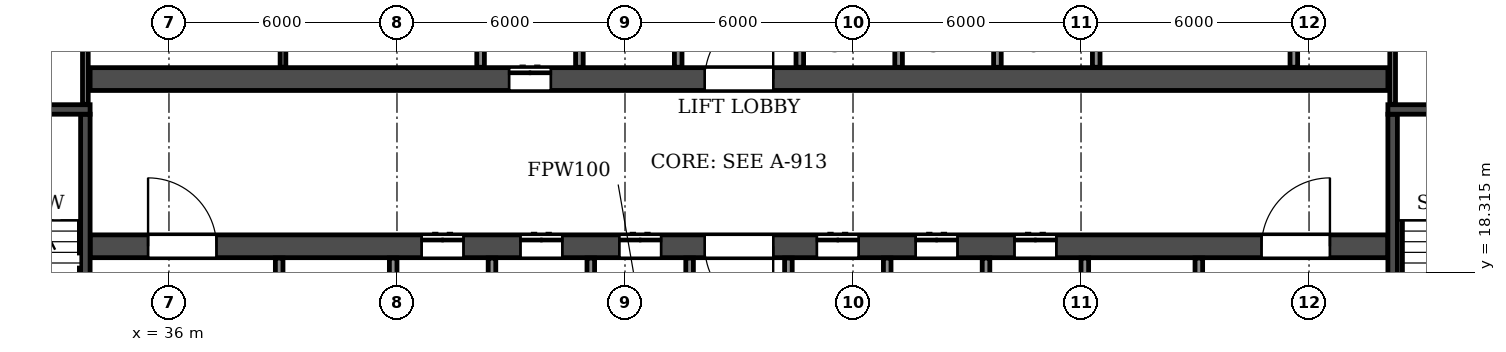
"""IFC4 building model, lengths in metres.
Left out: names, types, materials, properties, quantities, classifications, styles, units other than length and angle.
Written with IfcOpenShell. Run it as: python <this file> out.ifc"""

import sys

from ifc_helpers import new_model, si_unit, direction, frame, frame_2d, origin, place, context, subcontext, project, spatial, rectangle, extrude, element, fill, save


model = new_model("IFC4")
c1 = context("Model", 3, precision=1e-05, world=origin(), true_north=direction((0.0, 1.0)))
c2 = subcontext(c1, "Body", "Model", "MODEL_VIEW")
j1 = project(units=[si_unit("LENGTHUNIT", "METRE"), si_unit("PLANEANGLEUNIT", "RADIAN")], contexts=[c1])
p1 = place(None, origin())
s1 = spatial("IfcSite", under=j1, at=p1, CompositionType="ELEMENT")
p2 = place(p1, origin())
s2 = spatial("IfcBuilding", under=s1, at=p2, CompositionType="ELEMENT")
p3 = place(p2, frame((0.0, 0.0, 63.0)))
s3 = spatial("IfcBuildingStorey", under=s2, at=p3, CompositionType="ELEMENT", Elevation=63.0)
p4 = place(p3, frame((33.925, 19.0, 0.0), z_axis=(0.0, 0.0, 1.0), x_axis=(1.0, 0.0, 0.0)))
e1 = element("IfcWall", 1, at=p4, inside=s3, PredefinedType="SOLIDWALL", context=c2, shape_type="SweptSolid", body=[
    extrude(rectangle(XDim=34.15, YDim=0.6, at=frame_2d((17.075, 0.0))), origin(), (0.0, 0.0, 1.0), 2.95),
])
p5 = place(p4, frame((16.175, 0.0, 0.0)))
e2 = element("IfcOpeningElement", 2, at=p5, cuts=e1, PredefinedType="OPENING", context=c2, shape_type="SweptSolid", body=[
    extrude(rectangle(XDim=1.8, YDim=2.1, at=frame_2d((0.9, 1.05))), frame((0.0, 0.31, 0.0), z_axis=(0.0, -1.0, 0.0), x_axis=(1.0, 0.0, 0.0)), (0.0, 0.0, 1.0), 0.62),
])
p6 = place(p4, frame((1.525, 0.0, 0.0)))
e3 = element("IfcOpeningElement", 3, at=p6, cuts=e1, PredefinedType="OPENING", context=c2, shape_type="SweptSolid", body=[
    extrude(rectangle(XDim=1.8, YDim=2.1, at=frame_2d((0.9, 1.05))), frame((0.0, 0.31, 0.0), z_axis=(0.0, -1.0, 0.0), x_axis=(1.0, 0.0, 0.0)), (0.0, 0.0, 1.0), 0.62),
])
p7 = place(p4, frame((8.725, 0.0, 0.0)))
e4 = element("IfcOpeningElement", 4, at=p7, cuts=e1, PredefinedType="OPENING", context=c2, shape_type="SweptSolid", body=[
    extrude(rectangle(XDim=1.1, YDim=2.1, at=frame_2d((0.55, 1.05))), frame((0.0, 0.31, 0.0), z_axis=(0.0, -1.0, 0.0), x_axis=(1.0, 0.0, 0.0)), (0.0, 0.0, 1.0), 0.62),
])
p8 = place(p4, frame((11.325, 0.0, 0.0)))
e5 = element("IfcOpeningElement", 5, at=p8, cuts=e1, PredefinedType="OPENING", context=c2, shape_type="SweptSolid", body=[
    extrude(rectangle(XDim=1.1, YDim=2.1, at=frame_2d((0.55, 1.05))), frame((0.0, 0.31, 0.0), z_axis=(0.0, -1.0, 0.0), x_axis=(1.0, 0.0, 0.0)), (0.0, 0.0, 1.0), 0.62),
])
p9 = place(p4, frame((13.925, 0.0, 0.0)))
e6 = element("IfcOpeningElement", 6, at=p9, cuts=e1, PredefinedType="OPENING", context=c2, shape_type="SweptSolid", body=[
    extrude(rectangle(XDim=1.1, YDim=2.1, at=frame_2d((0.55, 1.05))), frame((0.0, 0.31, 0.0), z_axis=(0.0, -1.0, 0.0), x_axis=(1.0, 0.0, 0.0)), (0.0, 0.0, 1.0), 0.62),
])
p10 = place(p4, frame((19.125, 0.0, 0.0)))
e7 = element("IfcOpeningElement", 7, at=p10, cuts=e1, PredefinedType="OPENING", context=c2, shape_type="SweptSolid", body=[
    extrude(rectangle(XDim=1.1, YDim=2.1, at=frame_2d((0.55, 1.05))), frame((0.0, 0.31, 0.0), z_axis=(0.0, -1.0, 0.0), x_axis=(1.0, 0.0, 0.0)), (0.0, 0.0, 1.0), 0.62),
])
p11 = place(p4, frame((21.725, 0.0, 0.0)))
e8 = element("IfcOpeningElement", 8, at=p11, cuts=e1, PredefinedType="OPENING", context=c2, shape_type="SweptSolid", body=[
    extrude(rectangle(XDim=1.1, YDim=2.1, at=frame_2d((0.55, 1.05))), frame((0.0, 0.31, 0.0), z_axis=(0.0, -1.0, 0.0), x_axis=(1.0, 0.0, 0.0)), (0.0, 0.0, 1.0), 0.62),
])
p12 = place(p4, frame((24.325, 0.0, 0.0)))
e9 = element("IfcOpeningElement", 9, at=p12, cuts=e1, PredefinedType="OPENING", context=c2, shape_type="SweptSolid", body=[
    extrude(rectangle(XDim=1.1, YDim=2.1, at=frame_2d((0.55, 1.05))), frame((0.0, 0.31, 0.0), z_axis=(0.0, -1.0, 0.0), x_axis=(1.0, 0.0, 0.0)), (0.0, 0.0, 1.0), 0.62),
])
p13 = place(p4, frame((30.825, 0.0, 0.0)))
e10 = element("IfcOpeningElement", 10, at=p13, cuts=e1, PredefinedType="OPENING", context=c2, shape_type="SweptSolid", body=[
    extrude(rectangle(XDim=1.8, YDim=2.1, at=frame_2d((0.9, 1.05))), frame((0.0, 0.31, 0.0), z_axis=(0.0, -1.0, 0.0), x_axis=(1.0, 0.0, 0.0)), (0.0, 0.0, 1.0), 0.62),
])
p14 = place(p3, frame((33.925, 23.4, 0.0), z_axis=(0.0, 0.0, 1.0), x_axis=(1.0, 0.0, 0.0)))
e11 = element("IfcWall", 11, at=p14, inside=s3, PredefinedType="SOLIDWALL", context=c2, shape_type="SweptSolid", body=[
    extrude(rectangle(XDim=34.15, YDim=0.6, at=frame_2d((17.075, 0.0))), origin(), (0.0, 0.0, 1.0), 2.95),
])
p15 = place(p14, frame((16.175, 0.0, 0.0)))
e12 = element("IfcOpeningElement", 12, at=p15, cuts=e11, PredefinedType="OPENING", context=c2, shape_type="SweptSolid", body=[
    extrude(rectangle(XDim=1.8, YDim=2.1, at=frame_2d((0.9, 1.05))), frame((0.0, 0.31, 0.0), z_axis=(0.0, -1.0, 0.0), x_axis=(1.0, 0.0, 0.0)), (0.0, 0.0, 1.0), 0.62),
])
p16 = place(p14, frame((11.025, 0.0, 0.0)))
e13 = element("IfcOpeningElement", 13, at=p16, cuts=e11, PredefinedType="OPENING", context=c2, shape_type="SweptSolid", body=[
    extrude(rectangle(XDim=1.1, YDim=2.1, at=frame_2d((0.55, 1.05))), frame((0.0, 0.31, 0.0), z_axis=(0.0, -1.0, 0.0), x_axis=(1.0, 0.0, 0.0)), (0.0, 0.0, 1.0), 0.62),
])
p17 = place(p3, frame((33.8, 14.9, 0.0), z_axis=(0.0, 0.0, 1.0), x_axis=(0.0, 1.0, 0.0)))
e14 = element("IfcWall", 14, at=p17, inside=s3, PredefinedType="SOLIDWALL", context=c2, shape_type="SweptSolid", body=[
    extrude(rectangle(XDim=7.575, YDim=0.25, at=frame_2d((3.788, 0.0))), origin(), (0.0, 0.0, 1.0), 2.95),
])
p18 = place(p17, frame((0.4, 0.0, 0.0)))
e15 = element("IfcOpeningElement", 15, at=p18, cuts=e14, PredefinedType="OPENING", context=c2, shape_type="SweptSolid", body=[
    extrude(rectangle(XDim=1.0, YDim=2.1, at=frame_2d((0.5, 1.05))), frame((0.0, 0.135, 0.0), z_axis=(0.0, -1.0, 0.0), x_axis=(1.0, 0.0, 0.0)), (0.0, 0.0, 1.0), 0.27),
])
p19 = place(p3, frame((29.875, 22.6, 0.0), z_axis=(0.0, 0.0, 1.0), x_axis=(1.0, 0.0, 0.0)))
e16 = element("IfcWall", 16, at=p19, inside=s3, PredefinedType="SOLIDWALL", context=c2, shape_type="SweptSolid", body=[
    extrude(rectangle(XDim=4.05, YDim=0.25, at=frame_2d((2.025, 0.0))), origin(), (0.0, 0.0, 1.0), 2.95),
])
p20 = place(p3, frame((68.2, 14.9, 0.0), z_axis=(0.0, 0.0, 1.0), x_axis=(0.0, 1.0, 0.0)))
e17 = element("IfcWall", 17, at=p20, inside=s3, PredefinedType="SOLIDWALL", context=c2, shape_type="SweptSolid", body=[
    extrude(rectangle(XDim=7.575, YDim=0.25, at=frame_2d((3.788, 0.0))), origin(), (0.0, 0.0, 1.0), 2.95),
])
p21 = place(p20, frame((0.4, 0.0, 0.0)))
e18 = element("IfcOpeningElement", 18, at=p21, cuts=e17, PredefinedType="OPENING", context=c2, shape_type="SweptSolid", body=[
    extrude(rectangle(XDim=1.0, YDim=2.1, at=frame_2d((0.5, 1.05))), frame((0.0, 0.135, 0.0), z_axis=(0.0, -1.0, 0.0), x_axis=(1.0, 0.0, 0.0)), (0.0, 0.0, 1.0), 0.27),
])
p22 = place(p3, frame((68.075, 22.6, 0.0), z_axis=(0.0, 0.0, 1.0), x_axis=(1.0, 0.0, 0.0)))
e19 = element("IfcWall", 19, at=p22, inside=s3, PredefinedType="SOLIDWALL", context=c2, shape_type="SweptSolid", body=[
    extrude(rectangle(XDim=4.05, YDim=0.25, at=frame_2d((2.025, 0.0))), origin(), (0.0, 0.0, 1.0), 2.95),
])
p23 = place(p3, frame((39.0, 23.71, 0.0), z_axis=(0.0, 0.0, 1.0), x_axis=(0.0, 1.0, 0.0)))
e20 = element("IfcWall", 20, at=p23, inside=s3, PredefinedType="PARTITIONING", context=c2, shape_type="SweptSolid", body=[
    extrude(rectangle(XDim=3.78, YDim=0.15, at=frame_2d((1.89, 0.0))), origin(), (0.0, 0.0, 1.0), 2.95),
])
for number, where, z_axis, x_axis in (
    (21, (49.4, 23.71, 0.0), (0.0, 0.0, 1.0), (0.0, 1.0, 0.0)),
    (22, (65.6, 23.71, 0.0), (0.0, 0.0, 1.0), (0.0, 1.0, 0.0)),
):
    element("IfcWall", number, at=place(p3, frame(where, z_axis=z_axis, x_axis=x_axis)), inside=s3, PredefinedType="PARTITIONING", context=c2, shape_type="SweptSolid", body=[
        extrude(rectangle(XDim=3.78, YDim=0.2, at=frame_2d((1.89, 0.0))), origin(), (0.0, 0.0, 1.0), 2.95),
    ])
for number, where, z_axis, x_axis in (
    (23, (33.8, 22.735, 0.0), (0.0, 0.0, 1.0), (0.0, 1.0, 0.0)),
    (24, (68.2, 22.735, 0.0), (0.0, 0.0, 1.0), (0.0, 1.0, 0.0)),
):
    element("IfcWall", number, at=place(p3, frame(where, z_axis=z_axis, x_axis=x_axis)), inside=s3, PredefinedType="PARTITIONING", context=c2, shape_type="SweptSolid", body=[
        extrude(rectangle(XDim=4.755, YDim=0.15, at=frame_2d((2.377, 0.0))), origin(), (0.0, 0.0, 1.0), 2.95),
    ])
p24 = place(p3, frame((38.9, 14.91, 0.0), z_axis=(0.0, 0.0, 1.0), x_axis=(0.0, 1.0, 0.0)))
e25 = element("IfcWall", 25, at=p24, inside=s3, PredefinedType="PARTITIONING", context=c2, shape_type="SweptSolid", body=[
    extrude(rectangle(XDim=3.78, YDim=0.2, at=frame_2d((1.89, 0.0))), origin(), (0.0, 0.0, 1.0), 2.95),
])
p25 = place(p24, frame((1.34, 0.0, 0.0)))
e26 = element("IfcOpeningElement", 26, at=p25, cuts=e25, PredefinedType="OPENING", context=c2, shape_type="SweptSolid", body=[
    extrude(rectangle(XDim=1.1, YDim=2.1, at=frame_2d((0.55, 1.05))), frame((0.0, 0.11, 0.0), z_axis=(0.0, -1.0, 0.0), x_axis=(1.0, 0.0, 0.0)), (0.0, 0.0, 1.0), 0.22),
])
for number, where, z_axis, x_axis in (
    (27, (41.9, 14.91, 0.0), (0.0, 0.0, 1.0), (0.0, 1.0, 0.0)),
    (28, (44.2, 23.71, 0.0), (0.0, 0.0, 1.0), (0.0, 1.0, 0.0)),
):
    element("IfcWall", number, at=place(p3, frame(where, z_axis=z_axis, x_axis=x_axis)), inside=s3, PredefinedType="PARTITIONING", context=c2, shape_type="SweptSolid", body=[
        extrude(rectangle(XDim=3.78, YDim=0.2, at=frame_2d((1.89, 0.0))), origin(), (0.0, 0.0, 1.0), 2.95),
    ])
p26 = place(p3, frame((44.5, 16.3, 0.0), z_axis=(0.0, 0.0, 1.0), x_axis=(0.0, 1.0, 0.0)))
e29 = element("IfcWall", 29, at=p26, inside=s3, PredefinedType="PARTITIONING", context=c2, shape_type="SweptSolid", body=[
    extrude(rectangle(XDim=2.39, YDim=0.2, at=frame_2d((1.195, 0.0))), origin(), (0.0, 0.0, 1.0), 2.95),
])
p27 = place(p3, frame((46.8, 23.71, 0.0), z_axis=(0.0, 0.0, 1.0), x_axis=(0.0, 1.0, 0.0)))
e30 = element("IfcWall", 30, at=p27, inside=s3, PredefinedType="PARTITIONING", context=c2, shape_type="SweptSolid", body=[
    extrude(rectangle(XDim=3.78, YDim=0.2, at=frame_2d((1.89, 0.0))), origin(), (0.0, 0.0, 1.0), 2.95),
])
for number, where, z_axis, x_axis in (
    (31, (47.1, 16.3, 0.0), (0.0, 0.0, 1.0), (0.0, 1.0, 0.0)),
    (32, (49.7, 16.3, 0.0), (0.0, 0.0, 1.0), (0.0, 1.0, 0.0)),
    (33, (52.3, 16.3, 0.0), (0.0, 0.0, 1.0), (0.0, 1.0, 0.0)),
):
    element("IfcWall", number, at=place(p3, frame(where, z_axis=z_axis, x_axis=x_axis)), inside=s3, PredefinedType="PARTITIONING", context=c2, shape_type="SweptSolid", body=[
        extrude(rectangle(XDim=2.39, YDim=0.2, at=frame_2d((1.195, 0.0))), origin(), (0.0, 0.0, 1.0), 2.95),
    ])
p28 = place(p3, frame((52.6, 23.71, 0.0), z_axis=(0.0, 0.0, 1.0), x_axis=(0.0, 1.0, 0.0)))
e34 = element("IfcWall", 34, at=p28, inside=s3, PredefinedType="PARTITIONING", context=c2, shape_type="SweptSolid", body=[
    extrude(rectangle(XDim=2.39, YDim=0.2, at=frame_2d((1.195, 0.0))), origin(), (0.0, 0.0, 1.0), 2.95),
])
p29 = place(p3, frame((54.9, 16.3, 0.0), z_axis=(0.0, 0.0, 1.0), x_axis=(0.0, 1.0, 0.0)))
e35 = element("IfcWall", 35, at=p29, inside=s3, PredefinedType="PARTITIONING", context=c2, shape_type="SweptSolid", body=[
    extrude(rectangle(XDim=2.39, YDim=0.2, at=frame_2d((1.195, 0.0))), origin(), (0.0, 0.0, 1.0), 2.95),
])
p30 = place(p3, frame((55.2, 23.71, 0.0), z_axis=(0.0, 0.0, 1.0), x_axis=(0.0, 1.0, 0.0)))
e36 = element("IfcWall", 36, at=p30, inside=s3, PredefinedType="PARTITIONING", context=c2, shape_type="SweptSolid", body=[
    extrude(rectangle(XDim=2.39, YDim=0.2, at=frame_2d((1.195, 0.0))), origin(), (0.0, 0.0, 1.0), 2.95),
])
p31 = place(p3, frame((57.5, 16.3, 0.0), z_axis=(0.0, 0.0, 1.0), x_axis=(0.0, 1.0, 0.0)))
e37 = element("IfcWall", 37, at=p31, inside=s3, PredefinedType="PARTITIONING", context=c2, shape_type="SweptSolid", body=[
    extrude(rectangle(XDim=2.39, YDim=0.2, at=frame_2d((1.195, 0.0))), origin(), (0.0, 0.0, 1.0), 2.95),
])
p32 = place(p3, frame((57.8, 23.71, 0.0), z_axis=(0.0, 0.0, 1.0), x_axis=(0.0, 1.0, 0.0)))
e38 = element("IfcWall", 38, at=p32, inside=s3, PredefinedType="PARTITIONING", context=c2, shape_type="SweptSolid", body=[
    extrude(rectangle(XDim=2.39, YDim=0.2, at=frame_2d((1.195, 0.0))), origin(), (0.0, 0.0, 1.0), 2.95),
])
p33 = place(p3, frame((60.1, 14.91, 0.0), z_axis=(0.0, 0.0, 1.0), x_axis=(0.0, 1.0, 0.0)))
e39 = element("IfcWall", 39, at=p33, inside=s3, PredefinedType="PARTITIONING", context=c2, shape_type="SweptSolid", body=[
    extrude(rectangle(XDim=3.78, YDim=0.2, at=frame_2d((1.89, 0.0))), origin(), (0.0, 0.0, 1.0), 2.95),
])
p34 = place(p3, frame((60.4, 23.71, 0.0), z_axis=(0.0, 0.0, 1.0), x_axis=(0.0, 1.0, 0.0)))
e40 = element("IfcWall", 40, at=p34, inside=s3, PredefinedType="PARTITIONING", context=c2, shape_type="SweptSolid", body=[
    extrude(rectangle(XDim=2.39, YDim=0.2, at=frame_2d((1.195, 0.0))), origin(), (0.0, 0.0, 1.0), 2.95),
])
p35 = place(p3, frame((63.1, 14.91, 0.0), z_axis=(0.0, 0.0, 1.0), x_axis=(0.0, 1.0, 0.0)))
e41 = element("IfcWall", 41, at=p35, inside=s3, PredefinedType="PARTITIONING", context=c2, shape_type="SweptSolid", body=[
    extrude(rectangle(XDim=3.78, YDim=0.2, at=frame_2d((1.89, 0.0))), origin(), (0.0, 0.0, 1.0), 2.95),
])
p36 = place(p35, frame((1.34, 0.0, 0.0)))
e42 = element("IfcOpeningElement", 42, at=p36, cuts=e41, PredefinedType="OPENING", context=c2, shape_type="SweptSolid", body=[
    extrude(rectangle(XDim=1.1, YDim=2.1, at=frame_2d((0.55, 1.05))), frame((0.0, 0.11, 0.0), z_axis=(0.0, -1.0, 0.0), x_axis=(1.0, 0.0, 0.0)), (0.0, 0.0, 1.0), 0.22),
])
p37 = place(p15, origin())
e43 = element("IfcDoor", 43, at=p37, inside=s3, OperationType="DOUBLE_DOOR_SINGLE_SWING", PredefinedType="DOOR", context=c2, shape_type="SweptSolid", body=[
    extrude(rectangle(XDim=1.8, YDim=2.1, at=frame_2d((0.9, 1.05))), frame((0.0, 0.025, 0.0), z_axis=(0.0, -1.0, 0.0), x_axis=(1.0, 0.0, 0.0)), (0.0, 0.0, 1.0), 0.05),
])
fill(e12, e43)
p38 = place(p5, frame((1.8, 0.0, 0.0), z_axis=(0.0, 0.0, 1.0), x_axis=(-1.0, 0.0, 0.0)))
e44 = element("IfcDoor", 44, at=p38, inside=s3, OperationType="DOUBLE_DOOR_SINGLE_SWING", PredefinedType="DOOR", context=c2, shape_type="SweptSolid", body=[
    extrude(rectangle(XDim=1.8, YDim=2.1, at=frame_2d((0.9, 1.05))), frame((0.0, 0.025, 0.0), z_axis=(0.0, -1.0, 0.0), x_axis=(1.0, 0.0, 0.0)), (0.0, 0.0, 1.0), 0.05),
])
fill(e2, e44)
p39 = place(p6, origin())
e45 = element("IfcDoor", 45, at=p39, inside=s3, OperationType="DOUBLE_DOOR_SINGLE_SWING", PredefinedType="DOOR", context=c2, shape_type="SweptSolid", body=[
    extrude(rectangle(XDim=1.8, YDim=2.1, at=frame_2d((0.9, 1.05))), frame((0.0, 0.025, 0.0), z_axis=(0.0, -1.0, 0.0), x_axis=(1.0, 0.0, 0.0)), (0.0, 0.0, 1.0), 0.05),
])
fill(e3, e45)
p40 = place(p7, origin())
e46 = element("IfcDoor", 46, at=p40, inside=s3, OperationType="DOUBLE_DOOR_SLIDING", PredefinedType="DOOR", context=c2, shape_type="SweptSolid", body=[
    extrude(rectangle(XDim=1.1, YDim=2.1, at=frame_2d((0.55, 1.05))), frame((0.0, 0.025, 0.0), z_axis=(0.0, -1.0, 0.0), x_axis=(1.0, 0.0, 0.0)), (0.0, 0.0, 1.0), 0.05),
])
fill(e4, e46)
p41 = place(p16, origin())
e47 = element("IfcDoor", 47, at=p41, inside=s3, OperationType="DOUBLE_DOOR_SLIDING", PredefinedType="DOOR", context=c2, shape_type="SweptSolid", body=[
    extrude(rectangle(XDim=1.1, YDim=2.1, at=frame_2d((0.55, 1.05))), frame((0.0, 0.025, 0.0), z_axis=(0.0, -1.0, 0.0), x_axis=(1.0, 0.0, 0.0)), (0.0, 0.0, 1.0), 0.05),
])
fill(e13, e47)
p42 = place(p8, origin())
e48 = element("IfcDoor", 48, at=p42, inside=s3, OperationType="DOUBLE_DOOR_SLIDING", PredefinedType="DOOR", context=c2, shape_type="SweptSolid", body=[
    extrude(rectangle(XDim=1.1, YDim=2.1, at=frame_2d((0.55, 1.05))), frame((0.0, 0.025, 0.0), z_axis=(0.0, -1.0, 0.0), x_axis=(1.0, 0.0, 0.0)), (0.0, 0.0, 1.0), 0.05),
])
fill(e5, e48)
p43 = place(p9, origin())
e49 = element("IfcDoor", 49, at=p43, inside=s3, OperationType="DOUBLE_DOOR_SLIDING", PredefinedType="DOOR", context=c2, shape_type="SweptSolid", body=[
    extrude(rectangle(XDim=1.1, YDim=2.1, at=frame_2d((0.55, 1.05))), frame((0.0, 0.025, 0.0), z_axis=(0.0, -1.0, 0.0), x_axis=(1.0, 0.0, 0.0)), (0.0, 0.0, 1.0), 0.05),
])
fill(e6, e49)
p44 = place(p10, origin())
e50 = element("IfcDoor", 50, at=p44, inside=s3, OperationType="DOUBLE_DOOR_SLIDING", PredefinedType="DOOR", context=c2, shape_type="SweptSolid", body=[
    extrude(rectangle(XDim=1.1, YDim=2.1, at=frame_2d((0.55, 1.05))), frame((0.0, 0.025, 0.0), z_axis=(0.0, -1.0, 0.0), x_axis=(1.0, 0.0, 0.0)), (0.0, 0.0, 1.0), 0.05),
])
fill(e7, e50)
p45 = place(p11, origin())
e51 = element("IfcDoor", 51, at=p45, inside=s3, OperationType="DOUBLE_DOOR_SLIDING", PredefinedType="DOOR", context=c2, shape_type="SweptSolid", body=[
    extrude(rectangle(XDim=1.1, YDim=2.1, at=frame_2d((0.55, 1.05))), frame((0.0, 0.025, 0.0), z_axis=(0.0, -1.0, 0.0), x_axis=(1.0, 0.0, 0.0)), (0.0, 0.0, 1.0), 0.05),
])
fill(e8, e51)
p46 = place(p12, origin())
e52 = element("IfcDoor", 52, at=p46, inside=s3, OperationType="DOUBLE_DOOR_SLIDING", PredefinedType="DOOR", context=c2, shape_type="SweptSolid", body=[
    extrude(rectangle(XDim=1.1, YDim=2.1, at=frame_2d((0.55, 1.05))), frame((0.0, 0.025, 0.0), z_axis=(0.0, -1.0, 0.0), x_axis=(1.0, 0.0, 0.0)), (0.0, 0.0, 1.0), 0.05),
])
fill(e9, e52)
p47 = place(p13, origin())
e53 = element("IfcDoor", 53, at=p47, inside=s3, OperationType="DOUBLE_DOOR_SINGLE_SWING", PredefinedType="DOOR", context=c2, shape_type="SweptSolid", body=[
    extrude(rectangle(XDim=1.8, YDim=2.1, at=frame_2d((0.9, 1.05))), frame((0.0, 0.025, 0.0), z_axis=(0.0, -1.0, 0.0), x_axis=(1.0, 0.0, 0.0)), (0.0, 0.0, 1.0), 0.05),
])
fill(e10, e53)
save(model, sys.argv[1])
